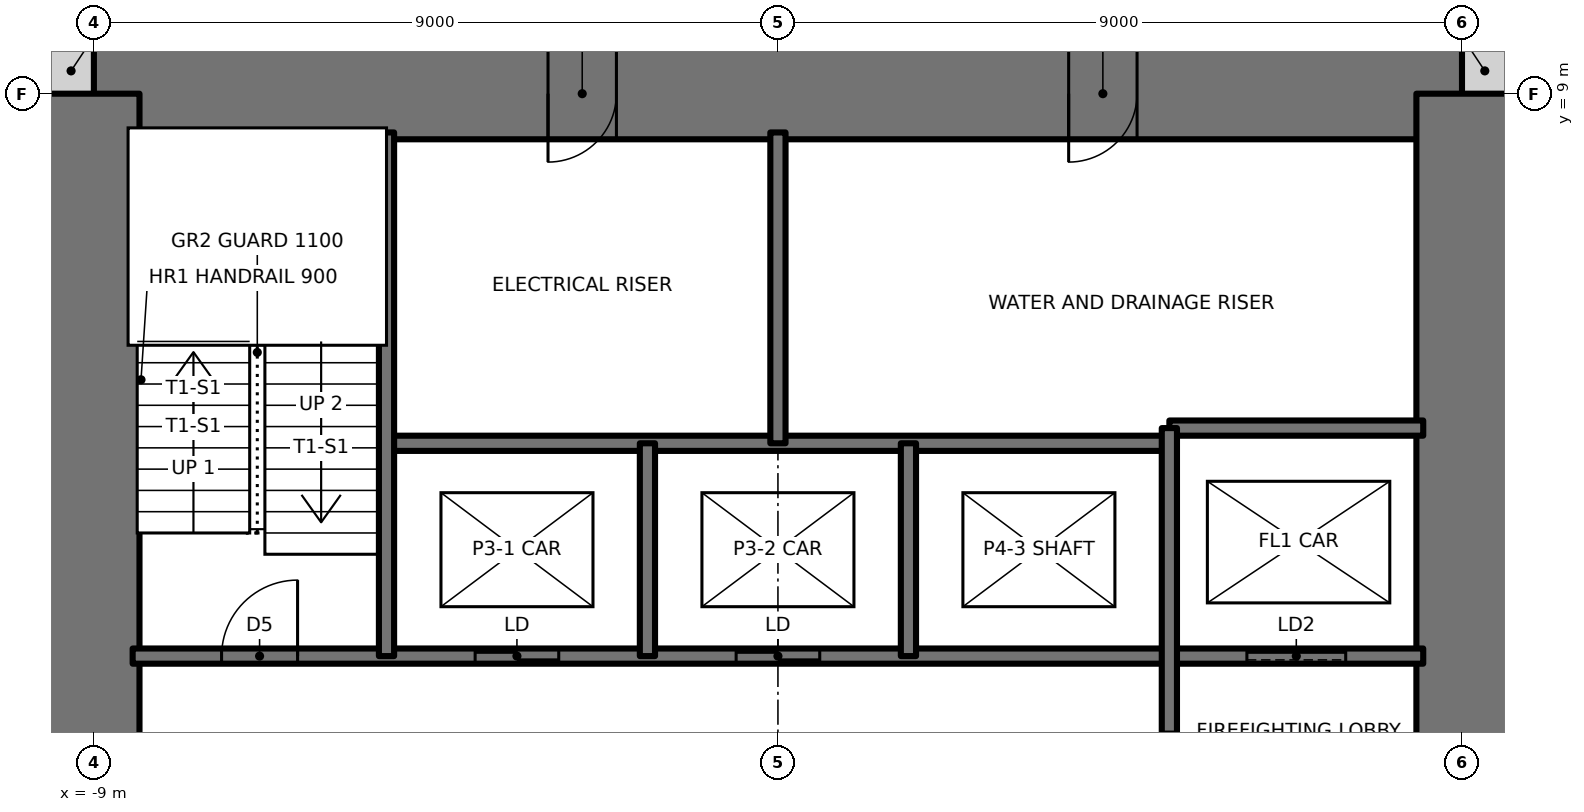
"""IFC4 building model, lengths in metres.
Left out: names, types, materials, properties, quantities, classifications, styles, units other than length and angle.
Written with IfcOpenShell. Run it as: python <this file> out.ifc"""

import sys

from ifc_helpers import new_model, si_unit, direction, frame, frame_2d, origin, place, context, subcontext, project, spatial, rectangle, extrude, element, fill, save


model = new_model("IFC4")
c1 = context("Model", 3, precision=1e-05, world=origin(), true_north=direction((0.0, 1.0)))
c2 = subcontext(c1, "Body", "Model", "MODEL_VIEW")
j1 = project(units=[si_unit("LENGTHUNIT", "METRE"), si_unit("PLANEANGLEUNIT", "RADIAN")], contexts=[c1])
p1 = place(None, origin())
s1 = spatial("IfcSite", under=j1, at=p1, CompositionType="ELEMENT")
p2 = place(p1, origin())
s2 = spatial("IfcBuilding", under=s1, at=p2, CompositionType="ELEMENT")
p3 = place(p2, frame((0.0, 0.0, 191.5)))
s3 = spatial("IfcBuildingStorey", under=s2, at=p3, CompositionType="ELEMENT", Elevation=191.5)
for number, where, z_axis, x_axis in (
    (1, (9.0, 9.3, 0.0), (0.0, 0.0, 1.0), (1.0, 0.0, 0.0)),
    (2, (-9.6, 9.3, 0.0), (0.0, 0.0, 1.0), (1.0, 0.0, 0.0)),
):
    element("IfcWall", number, at=place(p3, frame(where, z_axis=z_axis, x_axis=x_axis)), inside=s3, PredefinedType="SOLIDWALL", context=c2, shape_type="SweptSolid", body=[
        extrude(rectangle(XDim=0.6, YDim=0.6, at=frame_2d((0.3, 0.0))), origin(), (0.0, 0.0, 1.0), 3.5),
    ])
p4 = place(p3, frame((9.0, 9.0, 0.0), z_axis=(0.0, 0.0, 1.0), x_axis=(-1.0, 0.0, 0.0)))
e3 = element("IfcWall", 3, at=p4, inside=s3, PredefinedType="SHEAR", context=c2, shape_type="SweptSolid", body=[
    extrude(rectangle(XDim=18.0, YDim=1.2, at=frame_2d((9.0, 0.0))), origin(), (0.0, 0.0, 1.0), 3.5),
])
p5 = place(p4, frame((11.125, 0.0, 0.0)))
e4 = element("IfcOpeningElement", 4, at=p5, cuts=e3, PredefinedType="OPENING", context=c2, shape_type="SweptSolid", body=[
    extrude(rectangle(XDim=0.9, YDim=2.1, at=frame_2d((0.45, 1.05))), frame((0.0, 0.61, 0.0), z_axis=(0.0, -1.0, 0.0), x_axis=(1.0, 0.0, 0.0)), (0.0, 0.0, 1.0), 1.22),
])
p6 = place(p4, frame((4.275, 0.0, 0.0)))
e5 = element("IfcOpeningElement", 5, at=p6, cuts=e3, PredefinedType="OPENING", context=c2, shape_type="SweptSolid", body=[
    extrude(rectangle(XDim=0.9, YDim=2.1, at=frame_2d((0.45, 1.05))), frame((0.0, 0.61, 0.0), z_axis=(0.0, -1.0, 0.0), x_axis=(1.0, 0.0, 0.0)), (0.0, 0.0, 1.0), 1.22),
])
p7 = place(p3, frame((9.0, -9.0, 0.0), z_axis=(0.0, 0.0, 1.0), x_axis=(0.0, 1.0, 0.0)))
e6 = element("IfcWall", 6, at=p7, inside=s3, PredefinedType="SHEAR", context=c2, shape_type="SweptSolid", body=[
    extrude(rectangle(XDim=18.0, YDim=1.2, at=frame_2d((9.0, 0.0))), origin(), (0.0, 0.0, 1.0), 3.5),
])
p8 = place(p7, frame((8.5, 0.0, 0.0)))
e7 = element("IfcOpeningElement", 7, at=p8, cuts=e6, PredefinedType="OPENING", context=c2, shape_type="SweptSolid", body=[
    extrude(rectangle(XDim=1.0, YDim=2.1, at=frame_2d((0.5, 1.05))), frame((0.0, 0.61, 0.0), z_axis=(0.0, -1.0, 0.0), x_axis=(1.0, 0.0, 0.0)), (0.0, 0.0, 1.0), 1.22),
])
p9 = place(p3, frame((-9.0, 9.0, 0.0), z_axis=(0.0, 0.0, 1.0), x_axis=(0.0, -1.0, 0.0)))
e8 = element("IfcWall", 8, at=p9, inside=s3, PredefinedType="SHEAR", context=c2, shape_type="SweptSolid", body=[
    extrude(rectangle(XDim=18.0, YDim=1.2, at=frame_2d((9.0, 0.0))), origin(), (0.0, 0.0, 1.0), 3.5),
])
p10 = place(p9, frame((8.5, 0.0, 0.0)))
e9 = element("IfcOpeningElement", 9, at=p10, cuts=e8, PredefinedType="OPENING", context=c2, shape_type="SweptSolid", body=[
    extrude(rectangle(XDim=1.0, YDim=2.1, at=frame_2d((0.5, 1.05))), frame((0.0, 0.61, 0.0), z_axis=(0.0, -1.0, 0.0), x_axis=(1.0, 0.0, 0.0)), (0.0, 0.0, 1.0), 1.22),
])
p11 = place(p3, frame((-8.49, 1.6, 0.0), z_axis=(0.0, 0.0, 1.0), x_axis=(1.0, 0.0, 0.0)))
e10 = element("IfcWall", 10, at=p11, inside=s3, PredefinedType="SOLIDWALL", context=c2, shape_type="SweptSolid", body=[
    extrude(rectangle(XDim=16.98, YDim=0.2, at=frame_2d((8.49, 0.0))), origin(), (0.0, 0.0, 1.0), 3.5),
])
p12 = place(p11, frame((1.17, 0.0, 0.0)))
e11 = element("IfcOpeningElement", 11, at=p12, cuts=e10, PredefinedType="OPENING", context=c2, shape_type="SweptSolid", body=[
    extrude(rectangle(XDim=1.0, YDim=2.1, at=frame_2d((0.5, 1.05))), frame((0.0, 0.11, 0.0), z_axis=(0.0, -1.0, 0.0), x_axis=(1.0, 0.0, 0.0)), (0.0, 0.0, 1.0), 0.22),
])
p13 = place(p11, frame((4.506, 0.0, 0.0)))
e12 = element("IfcOpeningElement", 12, at=p13, cuts=e10, PredefinedType="OPENING", context=c2, shape_type="SweptSolid", body=[
    extrude(rectangle(XDim=1.1, YDim=2.1, at=frame_2d((0.55, 1.05))), frame((0.0, 0.11, 0.0), z_axis=(0.0, -1.0, 0.0), x_axis=(1.0, 0.0, 0.0)), (0.0, 0.0, 1.0), 0.22),
])
p14 = place(p11, frame((7.94, 0.0, 0.0)))
e13 = element("IfcOpeningElement", 13, at=p14, cuts=e10, PredefinedType="OPENING", context=c2, shape_type="SweptSolid", body=[
    extrude(rectangle(XDim=1.1, YDim=2.1, at=frame_2d((0.55, 1.05))), frame((0.0, 0.11, 0.0), z_axis=(0.0, -1.0, 0.0), x_axis=(1.0, 0.0, 0.0)), (0.0, 0.0, 1.0), 0.22),
])
p15 = place(p11, frame((14.66, 0.0, 0.0)))
e14 = element("IfcOpeningElement", 14, at=p15, cuts=e10, PredefinedType="OPENING", context=c2, shape_type="SweptSolid", body=[
    extrude(rectangle(XDim=1.3, YDim=2.1, at=frame_2d((0.65, 1.05))), frame((0.0, 0.11, 0.0), z_axis=(0.0, -1.0, 0.0), x_axis=(1.0, 0.0, 0.0)), (0.0, 0.0, 1.0), 0.22),
])
p16 = place(p3, frame((-5.15, 4.4, 0.0), z_axis=(0.0, 0.0, 1.0), x_axis=(1.0, 0.0, 0.0)))
e15 = element("IfcWall", 15, at=p16, inside=s3, PredefinedType="SOLIDWALL", context=c2, shape_type="SweptSolid", body=[
    extrude(rectangle(XDim=10.3, YDim=0.2, at=frame_2d((5.15, 0.0))), origin(), (0.0, 0.0, 1.0), 3.5),
])
p17 = place(p3, frame((5.15, 4.6, 0.0), z_axis=(0.0, 0.0, 1.0), x_axis=(1.0, 0.0, 0.0)))
e16 = element("IfcWall", 16, at=p17, inside=s3, PredefinedType="SOLIDWALL", context=c2, shape_type="SweptSolid", body=[
    extrude(rectangle(XDim=3.34, YDim=0.2, at=frame_2d((1.67, 0.0))), origin(), (0.0, 0.0, 1.0), 3.5),
])
p18 = place(p3, frame((5.15, -8.49, 0.0), z_axis=(0.0, 0.0, 1.0), x_axis=(0.0, 1.0, 0.0)))
e17 = element("IfcWall", 17, at=p18, inside=s3, PredefinedType="SOLIDWALL", context=c2, shape_type="SweptSolid", body=[
    extrude(rectangle(XDim=13.09, YDim=0.2, at=frame_2d((6.545, 0.0))), origin(), (0.0, 0.0, 1.0), 3.5),
])
p19 = place(p18, frame((7.89, 0.0, 0.0)))
e18 = element("IfcOpeningElement", 18, at=p19, cuts=e17, PredefinedType="OPENING", context=c2, shape_type="SweptSolid", body=[
    extrude(rectangle(XDim=1.2, YDim=2.1, at=frame_2d((0.6, 1.05))), frame((0.0, 0.11, 0.0), z_axis=(0.0, -1.0, 0.0), x_axis=(1.0, 0.0, 0.0)), (0.0, 0.0, 1.0), 0.22),
])
p20 = place(p3, frame((1.717, 1.6, 0.0), z_axis=(0.0, 0.0, 1.0), x_axis=(0.0, 1.0, 0.0)))
e19 = element("IfcWall", 19, at=p20, inside=s3, PredefinedType="SOLIDWALL", context=c2, shape_type="SweptSolid", body=[
    extrude(rectangle(XDim=2.8, YDim=0.2, at=frame_2d((1.4, 0.0))), origin(), (0.0, 0.0, 1.0), 3.5),
])
p21 = place(p3, frame((0.0, 4.4, 0.0), z_axis=(0.0, 0.0, 1.0), x_axis=(0.0, 1.0, 0.0)))
e20 = element("IfcWall", 20, at=p21, inside=s3, PredefinedType="SOLIDWALL", context=c2, shape_type="SweptSolid", body=[
    extrude(rectangle(XDim=4.09, YDim=0.2, at=frame_2d((2.045, 0.0))), origin(), (0.0, 0.0, 1.0), 3.5),
])
p22 = place(p3, frame((-1.717, 1.6, 0.0), z_axis=(0.0, 0.0, 1.0), x_axis=(0.0, 1.0, 0.0)))
e21 = element("IfcWall", 21, at=p22, inside=s3, PredefinedType="SOLIDWALL", context=c2, shape_type="SweptSolid", body=[
    extrude(rectangle(XDim=2.8, YDim=0.2, at=frame_2d((1.4, 0.0))), origin(), (0.0, 0.0, 1.0), 3.5),
])
p23 = place(p3, frame((-5.15, 1.6, 0.0), z_axis=(0.0, 0.0, 1.0), x_axis=(0.0, 1.0, 0.0)))
e22 = element("IfcWall", 22, at=p23, inside=s3, PredefinedType="SOLIDWALL", context=c2, shape_type="SweptSolid", body=[
    extrude(rectangle(XDim=6.89, YDim=0.2, at=frame_2d((3.445, 0.0))), origin(), (0.0, 0.0, 1.0), 3.5),
])
p24 = place(p12, origin())
e23 = element("IfcDoor", 23, at=p24, inside=s3, OperationType="SINGLE_SWING_RIGHT", PredefinedType="DOOR", context=c2, shape_type="SweptSolid", body=[
    extrude(rectangle(XDim=1.0, YDim=2.1, at=frame_2d((0.5, 1.05))), frame((0.0, 0.025, 0.0), z_axis=(0.0, -1.0, 0.0), x_axis=(1.0, 0.0, 0.0)), (0.0, 0.0, 1.0), 0.05),
])
fill(e11, e23)
p25 = place(p5, origin())
e24 = element("IfcDoor", 24, at=p25, inside=s3, OperationType="SINGLE_SWING_RIGHT", PredefinedType="DOOR", context=c2, shape_type="SweptSolid", body=[
    extrude(rectangle(XDim=0.9, YDim=2.1, at=frame_2d((0.45, 1.05))), frame((0.0, 0.025, 0.0), z_axis=(0.0, -1.0, 0.0), x_axis=(1.0, 0.0, 0.0)), (0.0, 0.0, 1.0), 0.05),
])
fill(e4, e24)
p26 = place(p6, origin())
e25 = element("IfcDoor", 25, at=p26, inside=s3, OperationType="SINGLE_SWING_RIGHT", PredefinedType="DOOR", context=c2, shape_type="SweptSolid", body=[
    extrude(rectangle(XDim=0.9, YDim=2.1, at=frame_2d((0.45, 1.05))), frame((0.0, 0.025, 0.0), z_axis=(0.0, -1.0, 0.0), x_axis=(1.0, 0.0, 0.0)), (0.0, 0.0, 1.0), 0.05),
])
fill(e5, e25)
p27 = place(p13, origin())
e26 = element("IfcDoor", 26, at=p27, inside=s3, OperationType="DOUBLE_DOOR_SLIDING", PredefinedType="DOOR", context=c2, shape_type="SweptSolid", body=[
    extrude(rectangle(XDim=1.1, YDim=2.1, at=frame_2d((0.55, 1.05))), frame((0.0, 0.025, 0.0), z_axis=(0.0, -1.0, 0.0), x_axis=(1.0, 0.0, 0.0)), (0.0, 0.0, 1.0), 0.05),
])
fill(e12, e26)
p28 = place(p14, origin())
e27 = element("IfcDoor", 27, at=p28, inside=s3, OperationType="DOUBLE_DOOR_SLIDING", PredefinedType="DOOR", context=c2, shape_type="SweptSolid", body=[
    extrude(rectangle(XDim=1.1, YDim=2.1, at=frame_2d((0.55, 1.05))), frame((0.0, 0.025, 0.0), z_axis=(0.0, -1.0, 0.0), x_axis=(1.0, 0.0, 0.0)), (0.0, 0.0, 1.0), 0.05),
])
fill(e13, e27)
p29 = place(p15, origin())
e28 = element("IfcDoor", 28, at=p29, inside=s3, OperationType="SLIDING_TO_LEFT", PredefinedType="DOOR", context=c2, shape_type="SweptSolid", body=[
    extrude(rectangle(XDim=1.3, YDim=2.1, at=frame_2d((0.65, 1.05))), frame((0.0, 0.025, 0.0), z_axis=(0.0, -1.0, 0.0), x_axis=(1.0, 0.0, 0.0)), (0.0, 0.0, 1.0), 0.05),
])
fill(e14, e28)
save(model, sys.argv[1])
